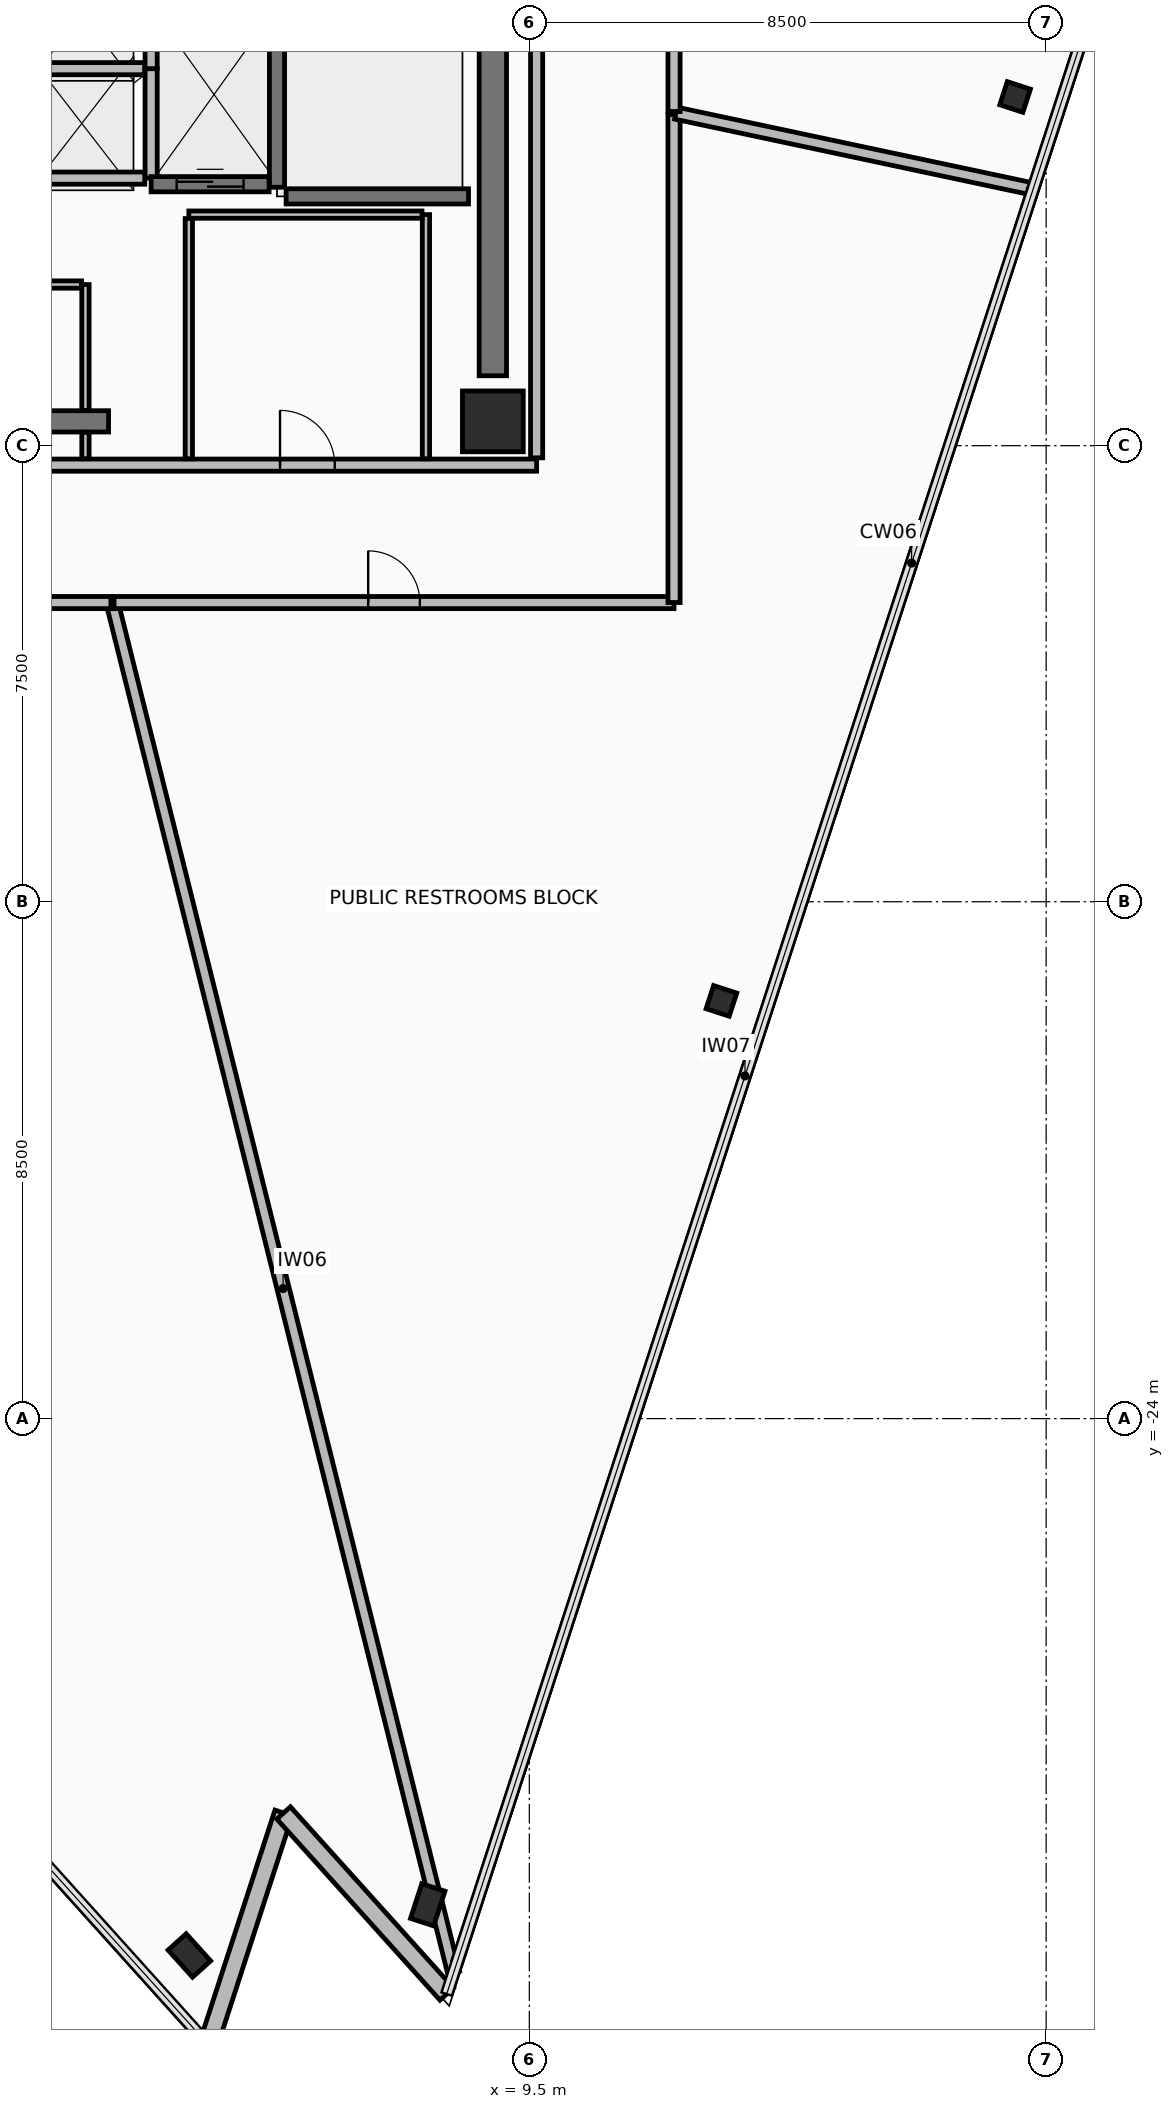
"""IFC4 building model, lengths in metres.
Left out: names, types, materials, properties, quantities, classifications, styles, units other than length and angle.
Written with IfcOpenShell. Run it as: python <this file> out.ifc"""

import sys

from ifc_helpers import new_model, si_unit, direction, frame, frame_2d, origin, origin_2d, place, context, subcontext, project, spatial, rectangle, hollow_rectangle, extrude, element, fill, save


model = new_model("IFC4")
c1 = context("Model", 3, precision=1e-05, world=origin(), true_north=direction((0.0, 1.0)))
c2 = subcontext(c1, "Body", "Model", "MODEL_VIEW")
j1 = project(units=[si_unit("LENGTHUNIT", "METRE"), si_unit("PLANEANGLEUNIT", "RADIAN")], contexts=[c1])
p1 = place(None, origin())
s1 = spatial("IfcSite", under=j1, at=p1, CompositionType="ELEMENT")
p2 = place(p1, origin())
s2 = spatial("IfcBuilding", under=s1, at=p2, CompositionType="ELEMENT")
p3 = place(p2, frame((0.0, 0.0, 290.7)))
s3 = spatial("IfcBuildingStorey", under=s2, at=p3, CompositionType="ELEMENT", Elevation=290.7)
p4 = place(p3, frame((8.9, -7.6, 0.0), z_axis=(0.0, 0.0, 1.0), x_axis=(1.0, 0.0, 0.0)))
e1 = element("IfcColumn", 1, at=p4, inside=s3, PredefinedType="COLUMN", context=c2, shape_type="SweptSolid", body=[
    extrude(rectangle(XDim=1.0, YDim=1.0, at=origin_2d()), origin(), (0.0, 0.0, 1.0), 3.65),
])
for number, where, z_axis, x_axis in (
    (2, (3.909, -32.829, 0.0), (0.0, 0.0, 1.0), (-0.669, 0.743, 0.0)),
    (3, (7.829, -31.996, 0.0), (0.0, 0.0, 1.0), (0.309, 0.951, 0.0)),
):
    element("IfcColumn", number, at=place(p3, frame(where, z_axis=z_axis, x_axis=x_axis)), inside=s3, PredefinedType="COLUMN", context=c2, shape_type="SweptSolid", body=[
        extrude(hollow_rectangle(XDim=0.4, YDim=0.6, WallThickness=0.03, at=origin_2d()), origin(), (0.0, 0.0, 1.0), 3.65),
    ])
for number, where, z_axis, x_axis in (
    (4, (12.659, -17.131, 0.0), (0.0, 0.0, 1.0), (0.309, 0.951, 0.0)),
    (5, (17.489, -2.265, 0.0), (0.0, 0.0, 1.0), (0.309, 0.951, 0.0)),
):
    element("IfcColumn", number, at=place(p3, frame(where, z_axis=z_axis, x_axis=x_axis)), inside=s3, PredefinedType="COLUMN", context=c2, shape_type="SweptSolid", body=[
        extrude(hollow_rectangle(XDim=0.4, YDim=0.4, WallThickness=0.025, at=origin_2d()), origin(), (0.0, 0.0, 1.0), 3.65),
    ])
p5 = place(p3, frame((4.221, -34.296, 0.0), z_axis=(0.0, 0.0, 1.0), x_axis=(0.309018580232, 0.951056001018, 0.0)))
e6 = element("IfcWall", 6, at=p5, inside=s3, PredefinedType="STANDARD", context=c2, shape_type="SweptSolid", body=[
    extrude(rectangle(XDim=4.008, YDim=0.3, at=frame_2d((2.004, 0.0))), origin(), (0.0, 0.0, 1.0), 2.81),
])
p6 = place(p3, frame((5.459, -30.484, 0.0), z_axis=(0.0, 0.0, 1.0), x_axis=(0.669132983361, -0.743142685208, 0.0)))
e7 = element("IfcWall", 7, at=p6, inside=s3, PredefinedType="STANDARD", context=c2, shape_type="SweptSolid", body=[
    extrude(rectangle(XDim=4.008, YDim=0.3, at=frame_2d((2.004, 0.0))), origin(), (0.0, 0.0, 1.0), 2.81),
])
p7 = place(p3, frame((-2.8, -7.6, 0.0), z_axis=(0.0, 0.0, 1.0), x_axis=(1.0, 0.0, 0.0)))
e8 = element("IfcWall", 8, at=p7, inside=s3, PredefinedType="SHEAR", context=c2, shape_type="SweptSolid", body=[
    extrude(rectangle(XDim=5.38, YDim=0.35, at=frame_2d((2.69, 0.0))), origin(), (0.0, 0.0, 1.0), 3.465),
])
p8 = place(p3, frame((8.9, -6.85, 0.0), z_axis=(0.0, 0.0, 1.0), x_axis=(0.0, 1.0, 0.0)))
e9 = element("IfcWall", 9, at=p8, inside=s3, PredefinedType="SHEAR", context=c2, shape_type="SweptSolid", body=[
    extrude(rectangle(XDim=10.7, YDim=0.45, at=frame_2d((5.35, 0.0))), origin(), (0.0, 0.0, 1.0), 3.465),
])
p9 = place(p3, frame((-9.62, -8.32, 0.0), z_axis=(0.0, 0.0, 1.0), x_axis=(1.0, 0.0, 0.0)))
e10 = element("IfcWall", 10, at=p9, inside=s3, PredefinedType="PARTITIONING", context=c2, shape_type="SweptSolid", body=[
    extrude(rectangle(XDim=19.24, YDim=0.2, at=frame_2d((9.62, 0.0))), origin(), (0.0, 0.0, 1.0), 2.96),
])
p10 = place(p9, frame((8.57, 0.0, 0.0)))
e11 = element("IfcOpeningElement", 11, at=p10, cuts=e10, PredefinedType="OPENING", context=c2, shape_type="SweptSolid", body=[
    extrude(rectangle(XDim=0.9, YDim=2.1, at=frame_2d((0.45, 1.05))), frame((0.0, 0.11, 0.0), z_axis=(0.0, -1.0, 0.0), x_axis=(1.0, 0.0, 0.0)), (0.0, 0.0, 1.0), 0.22),
])
p11 = place(p9, frame((15.02, 0.0, 0.0)))
e12 = element("IfcOpeningElement", 12, at=p11, cuts=e10, PredefinedType="OPENING", context=c2, shape_type="SweptSolid", body=[
    extrude(rectangle(XDim=0.9, YDim=2.1, at=frame_2d((0.45, 1.05))), frame((0.0, 0.11, 0.0), z_axis=(0.0, -1.0, 0.0), x_axis=(1.0, 0.0, 0.0)), (0.0, 0.0, 1.0), 0.22),
])
p12 = place(p3, frame((9.62, -8.2, 0.0), z_axis=(0.0, 0.0, 1.0), x_axis=(0.0, 1.0, 0.0)))
e13 = element("IfcWall", 13, at=p12, inside=s3, PredefinedType="PARTITIONING", context=c2, shape_type="SweptSolid", body=[
    extrude(rectangle(XDim=16.4, YDim=0.2, at=frame_2d((8.2, 0.0))), origin(), (0.0, 0.0, 1.0), 2.96),
])
p13 = place(p12, frame((12.65, 0.0, 0.0)))
e14 = element("IfcOpeningElement", 14, at=p13, cuts=e13, PredefinedType="OPENING", context=c2, shape_type="SweptSolid", body=[
    extrude(rectangle(XDim=1.1, YDim=2.15, at=frame_2d((0.55, 1.075))), frame((0.0, 0.11, 0.0), z_axis=(0.0, -1.0, 0.0), x_axis=(1.0, 0.0, 0.0)), (0.0, 0.0, 1.0), 0.22),
])
p14 = place(p3, frame((5.35, -3.75, 0.0), z_axis=(0.0, 0.0, 1.0), x_axis=(0.0, 1.0, 0.0)))
e15 = element("IfcWall", 15, at=p14, inside=s3, PredefinedType="SHEAR", context=c2, shape_type="SweptSolid", body=[
    extrude(rectangle(XDim=7.3, YDim=0.25, at=frame_2d((3.65, 0.0))), origin(), (0.0, 0.0, 1.0), 3.465),
])
p15 = place(p3, frame((5.5, -3.9, 0.0), z_axis=(0.0, 0.0, 1.0), x_axis=(1.0, 0.0, 0.0)))
e16 = element("IfcWall", 16, at=p15, inside=s3, PredefinedType="SHEAR", context=c2, shape_type="SweptSolid", body=[
    extrude(rectangle(XDim=3.0, YDim=0.25, at=frame_2d((1.5, 0.0))), origin(), (0.0, 0.0, 1.0), 3.465),
])
p16 = place(p3, frame((3.28, -3.6, 0.0), z_axis=(0.0, 0.0, 1.0), x_axis=(0.0, 1.0, 0.0)))
e17 = element("IfcWall", 17, at=p16, inside=s3, PredefinedType="PARTITIONING", context=c2, shape_type="SweptSolid", body=[
    extrude(rectangle(XDim=1.8, YDim=0.2, at=frame_2d((0.9, 0.0))), origin(), (0.0, 0.0, 1.0), 3.465),
])
for number, where, z_axis, x_axis in (
    (18, (1.13, -3.6, 0.0), (0.0, 0.0, 1.0), (1.0, 0.0, 0.0)),
    (19, (1.13, -1.8, 0.0), (0.0, 0.0, 1.0), (1.0, 0.0, 0.0)),
):
    element("IfcWall", number, at=place(p3, frame(where, z_axis=z_axis, x_axis=x_axis)), inside=s3, PredefinedType="PARTITIONING", context=c2, shape_type="SweptSolid", body=[
        extrude(rectangle(XDim=2.045, YDim=0.2, at=frame_2d((1.022, 0.0))), origin(), (0.0, 0.0, 1.0), 3.465),
    ])
p17 = place(p3, frame((3.28, -1.8, 0.0), z_axis=(0.0, 0.0, 1.0), x_axis=(0.0, 1.0, 0.0)))
e20 = element("IfcWall", 20, at=p17, inside=s3, PredefinedType="PARTITIONING", context=c2, shape_type="SweptSolid", body=[
    extrude(rectangle(XDim=1.8, YDim=0.2, at=frame_2d((0.9, 0.0))), origin(), (0.0, 0.0, 1.0), 3.465),
])
p18 = place(p3, frame((3.28, -3.7, 0.0), z_axis=(0.0, 0.0, 1.0), x_axis=(1.0, 0.0, 0.0)))
e21 = element("IfcWall", 21, at=p18, inside=s3, PredefinedType="SHEAR", context=c2, shape_type="SweptSolid", body=[
    extrude(rectangle(XDim=1.94, YDim=0.25, at=frame_2d((0.97, 0.0))), origin(), (0.0, 0.0, 1.0), 3.465),
])
p19 = place(p18, frame((0.42, 0.0, 0.0)))
e22 = element("IfcOpeningElement", 22, at=p19, cuts=e21, PredefinedType="OPENING", context=c2, shape_type="SweptSolid", body=[
    extrude(rectangle(XDim=1.1, YDim=2.2, at=frame_2d((0.55, 1.1))), frame((0.0, 0.135, 0.0), z_axis=(0.0, -1.0, 0.0), x_axis=(1.0, 0.0, 0.0)), (0.0, 0.0, 1.0), 0.27),
])
p20 = place(p3, frame((2.2, -8.215, 0.0), z_axis=(0.0, 0.0, 1.0), x_axis=(0.0, 1.0, 0.0)))
e23 = element("IfcWall", 23, at=p20, inside=s3, PredefinedType="PARTITIONING", context=c2, shape_type="SweptSolid", body=[
    extrude(rectangle(XDim=0.435, YDim=0.12, at=frame_2d((0.218, 0.0))), origin(), (0.0, 0.0, 1.0), 2.76),
])
p21 = place(p3, frame((2.2, -7.42, 0.0), z_axis=(0.0, 0.0, 1.0), x_axis=(0.0, 1.0, 0.0)))
e24 = element("IfcWall", 24, at=p21, inside=s3, PredefinedType="PARTITIONING", context=c2, shape_type="SweptSolid", body=[
    extrude(rectangle(XDim=2.07, YDim=0.12, at=frame_2d((1.035, 0.0))), origin(), (0.0, 0.0, 1.0), 2.76),
])
p22 = place(p3, frame((2.135, -5.35, 0.0), z_axis=(0.0, 0.0, 1.0), x_axis=(-1.0, 0.0, 0.0)))
e25 = element("IfcWall", 25, at=p22, inside=s3, PredefinedType="PARTITIONING", context=c2, shape_type="SweptSolid", body=[
    extrude(rectangle(XDim=5.535, YDim=0.12, at=frame_2d((2.768, 0.0))), origin(), (0.0, 0.0, 1.0), 2.76),
])
p23 = place(p3, frame((7.8, -8.215, 0.0), z_axis=(0.0, 0.0, 1.0), x_axis=(0.0, 1.0, 0.0)))
e26 = element("IfcWall", 26, at=p23, inside=s3, PredefinedType="PARTITIONING", context=c2, shape_type="SweptSolid", body=[
    extrude(rectangle(XDim=4.015, YDim=0.12, at=frame_2d((2.008, 0.0))), origin(), (0.0, 0.0, 1.0), 2.76),
])
p24 = place(p3, frame((7.735, -4.2, 0.0), z_axis=(0.0, 0.0, 1.0), x_axis=(-1.0, 0.0, 0.0)))
e27 = element("IfcWall", 27, at=p24, inside=s3, PredefinedType="PARTITIONING", context=c2, shape_type="SweptSolid", body=[
    extrude(rectangle(XDim=3.835, YDim=0.12, at=frame_2d((1.917, 0.0))), origin(), (0.0, 0.0, 1.0), 3.465),
])
p25 = place(p3, frame((3.9, -4.265, 0.0), z_axis=(0.0, 0.0, 1.0), x_axis=(0.0, -1.0, 0.0)))
e28 = element("IfcWall", 28, at=p25, inside=s3, PredefinedType="PARTITIONING", context=c2, shape_type="SweptSolid", body=[
    extrude(rectangle(XDim=3.95, YDim=0.12, at=frame_2d((1.975, 0.0))), origin(), (0.0, 0.0, 1.0), 2.76),
])
p26 = place(p3, frame((8.256, -33.111, 0.0), z_axis=(0.0, 0.0, 1.0), x_axis=(-0.241931126379, 0.970293424738, 0.0)))
e29 = element("IfcWall", 29, at=p26, inside=s3, PredefinedType="PARTITIONING", context=c2, shape_type="SweptSolid", body=[
    extrude(rectangle(XDim=23.189, YDim=0.2, at=frame_2d((11.594, 0.0))), origin(), (0.0, 0.0, 1.0), 2.81),
])
p27 = place(p3, frame((2.67, -10.58, 0.0), z_axis=(0.0, 0.0, 1.0), x_axis=(1.0, 0.0, 0.0)))
e30 = element("IfcWall", 30, at=p27, inside=s3, PredefinedType="PARTITIONING", context=c2, shape_type="SweptSolid", body=[
    extrude(rectangle(XDim=9.209, YDim=0.2, at=frame_2d((4.605, 0.0))), origin(), (0.0, 0.0, 1.0), 2.96),
])
p28 = place(p27, frame((4.18, 0.0, 0.0)))
e31 = element("IfcOpeningElement", 31, at=p28, cuts=e30, PredefinedType="OPENING", context=c2, shape_type="SweptSolid", body=[
    extrude(rectangle(XDim=0.85, YDim=2.1, at=frame_2d((0.425, 1.05))), frame((0.0, 0.11, 0.0), z_axis=(0.0, -1.0, 0.0), x_axis=(1.0, 0.0, 0.0)), (0.0, 0.0, 1.0), 0.22),
])
p29 = place(p3, frame((11.88, -10.579, 0.0), z_axis=(0.0, 0.0, 1.0), x_axis=(0.0, 1.0, 0.0)))
e32 = element("IfcWall", 32, at=p29, inside=s3, PredefinedType="PARTITIONING", context=c2, shape_type="SweptSolid", body=[
    extrude(rectangle(XDim=8.023, YDim=0.2, at=frame_2d((4.012, 0.0))), origin(), (0.0, 0.0, 1.0), 2.96),
])
p30 = place(p3, frame((11.91, -2.531, 0.0), z_axis=(0.0, 0.0, 1.0), x_axis=(0.978144111738, -0.207928104574, 0.0)))
e33 = element("IfcWall", 33, at=p30, inside=s3, PredefinedType="PARTITIONING", context=c2, shape_type="SweptSolid", body=[
    extrude(rectangle(XDim=5.979, YDim=0.2, at=frame_2d((2.989, 0.0))), origin(), (0.0, 0.0, 1.0), 2.81),
])
p31 = place(p3, frame((17.777, -3.807, 0.0), z_axis=(0.0, 0.0, 1.0), x_axis=(-0.309024581215, -0.951054051148, 0.0)))
e34 = element("IfcWall", 34, at=p31, inside=s3, PredefinedType="PARTITIONING", context=c2, shape_type="SweptSolid", body=[
    extrude(rectangle(XDim=30.614, YDim=0.15, at=frame_2d((15.307, 0.0))), origin(), (0.0, 0.0, 1.0), 3.465),
])
p32 = place(p3, frame((23.379, 13.433, 0.0), z_axis=(0.0, 0.0, 1.0), x_axis=(-0.309022856951, -0.951054611409, 0.0)))
e35 = element("IfcWall", 35, at=p32, inside=s3, PredefinedType="PARTITIONING", context=c2, shape_type="SweptSolid", body=[
    extrude(rectangle(XDim=18.077, YDim=0.15, at=frame_2d((9.039, 0.0))), origin(), (0.0, 0.0, 1.0), 3.465),
])
p33 = place(p3, frame((11.88, -2.505, 0.0), z_axis=(0.0, 0.0, 1.0), x_axis=(0.0, 1.0, 0.0)))
e36 = element("IfcWall", 36, at=p33, inside=s3, PredefinedType="PARTITIONING", context=c2, shape_type="SweptSolid", body=[
    extrude(rectangle(XDim=13.084, YDim=0.2, at=frame_2d((6.542, 0.0))), origin(), (0.0, 0.0, 1.0), 2.96),
])
p34 = place(p33, frame((6.117, 0.0, 0.0)))
e37 = element("IfcOpeningElement", 37, at=p34, cuts=e36, PredefinedType="OPENING", context=c2, shape_type="SweptSolid", body=[
    extrude(rectangle(XDim=0.85, YDim=2.1, at=frame_2d((0.425, 1.05))), frame((0.0, 0.11, 0.0), z_axis=(0.0, -1.0, 0.0), x_axis=(1.0, 0.0, 0.0)), (0.0, 0.0, 1.0), 0.22),
])
p35 = place(p3, frame((-11.879, -10.58, 0.0), z_axis=(0.0, 0.0, 1.0), x_axis=(1.0, 0.0, 0.0)))
e38 = element("IfcWall", 38, at=p35, inside=s3, PredefinedType="PARTITIONING", context=c2, shape_type="SweptSolid", body=[
    extrude(rectangle(XDim=14.498, YDim=0.2, at=frame_2d((7.249, 0.0))), origin(), (0.0, 0.0, 1.0), 2.96),
])
p36 = place(p35, frame((6.649, 0.0, 0.0)))
e39 = element("IfcOpeningElement", 39, at=p36, cuts=e38, PredefinedType="OPENING", context=c2, shape_type="SweptSolid", body=[
    extrude(rectangle(XDim=1.2, YDim=2.15, at=frame_2d((0.6, 1.075))), frame((0.0, 0.11, 0.0), z_axis=(0.0, -1.0, 0.0), x_axis=(1.0, 0.0, 0.0)), (0.0, 0.0, 1.0), 0.22),
])
p37 = place(p19, origin())
e40 = element("IfcDoor", 40, at=p37, inside=s3, OperationType="SLIDING_TO_LEFT", PredefinedType="DOOR", context=c2, shape_type="SweptSolid", body=[
    extrude(rectangle(XDim=1.1, YDim=2.2, at=frame_2d((0.55, 1.1))), frame((0.0, 0.025, 0.0), z_axis=(0.0, -1.0, 0.0), x_axis=(1.0, 0.0, 0.0)), (0.0, 0.0, 1.0), 0.05),
])
fill(e22, e40)
p38 = place(p11, origin())
e41 = element("IfcDoor", 41, at=p38, inside=s3, OperationType="SINGLE_SWING_LEFT", PredefinedType="DOOR", context=c2, shape_type="SweptSolid", body=[
    extrude(rectangle(XDim=0.9, YDim=2.1, at=frame_2d((0.45, 1.05))), frame((0.0, 0.025, 0.0), z_axis=(0.0, -1.0, 0.0), x_axis=(1.0, 0.0, 0.0)), (0.0, 0.0, 1.0), 0.05),
])
fill(e12, e41)
p39 = place(p28, origin())
e42 = element("IfcDoor", 42, at=p39, inside=s3, OperationType="SINGLE_SWING_RIGHT", PredefinedType="DOOR", context=c2, shape_type="SweptSolid", body=[
    extrude(rectangle(XDim=0.85, YDim=2.1, at=frame_2d((0.425, 1.05))), frame((0.0, 0.025, 0.0), z_axis=(0.0, -1.0, 0.0), x_axis=(1.0, 0.0, 0.0)), (0.0, 0.0, 1.0), 0.05),
])
fill(e31, e42)
save(model, sys.argv[1])
